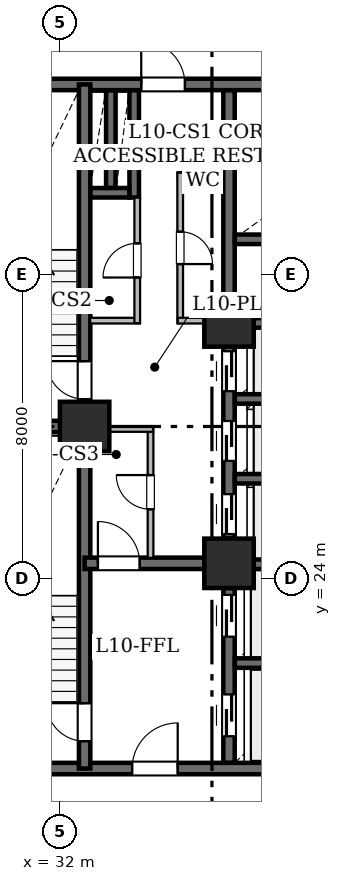
"""IFC4 building model, lengths in metres.
Left out: names, types, materials, properties, quantities, classifications, styles, units other than length and angle.
Written with IfcOpenShell. Run it as: python <this file> out.ifc"""

import sys

from ifc_helpers import new_model, si_unit, direction, frame, frame_2d, origin, origin_2d, place, context, subcontext, project, spatial, rectangle, hollow_rectangle, extrude, element, fill, save


model = new_model("IFC4")
c1 = context("Model", 3, precision=1e-05, world=origin(), true_north=direction((0.0, 1.0)))
c2 = subcontext(c1, "Body", "Model", "MODEL_VIEW")
j1 = project(units=[si_unit("LENGTHUNIT", "METRE"), si_unit("PLANEANGLEUNIT", "RADIAN")], contexts=[c1])
p1 = place(None, origin())
s1 = spatial("IfcSite", under=j1, at=p1, CompositionType="ELEMENT")
p2 = place(p1, origin())
s2 = spatial("IfcBuilding", under=s1, at=p2, CompositionType="ELEMENT")
p3 = place(p2, frame((0.0, 0.0, 44.25)))
s3 = spatial("IfcBuildingStorey", under=s2, at=p3, CompositionType="ELEMENT", Elevation=44.25)
for number, where, z_axis, x_axis in (
    (1, (32.65, 28.0, 0.0), (0.0, 0.0, 1.0), (1.0, 0.0, 0.0)),
    (2, (36.45, 24.4, 0.0), (0.0, 0.0, 1.0), (1.0, 0.0, 0.0)),
    (3, (36.45, 30.75, 0.0), (0.0, 0.0, 1.0), (1.0, 0.0, 0.0)),
):
    element("IfcColumn", number, at=place(p3, frame(where, z_axis=z_axis, x_axis=x_axis)), inside=s3, PredefinedType="COLUMN", context=c2, shape_type="SweptSolid", body=[
        extrude(hollow_rectangle(XDim=1.3, YDim=1.3, WallThickness=0.065, at=origin_2d()), origin(), (0.0, 0.0, 1.0), 3.65),
    ])
p4 = place(p3, frame((29.0, 19.0, 0.0), z_axis=(0.0, 0.0, 1.0), x_axis=(1.0, 0.0, 0.0)))
e4 = element("IfcWall", 4, at=p4, inside=s3, PredefinedType="SHEAR", context=c2, shape_type="SweptSolid", body=[
    extrude(rectangle(XDim=10.4, YDim=0.3, at=frame_2d((5.2, 0.0))), origin(), (0.0, 0.0, 1.0), 3.43),
])
p5 = place(p4, frame((4.9, 0.0, 0.0)))
e5 = element("IfcOpeningElement", 5, at=p5, cuts=e4, PredefinedType="OPENING", context=c2, shape_type="SweptSolid", body=[
    extrude(rectangle(XDim=1.2, YDim=2.15, at=frame_2d((0.6, 1.075))), frame((0.0, 0.16, 0.0), z_axis=(0.0, -1.0, 0.0), x_axis=(1.0, 0.0, 0.0)), (0.0, 0.0, 1.0), 0.32),
])
p6 = place(p3, frame((29.0, 37.0, 0.0), z_axis=(0.0, 0.0, 1.0), x_axis=(1.0, 0.0, 0.0)))
e6 = element("IfcWall", 6, at=p6, inside=s3, PredefinedType="SHEAR", context=c2, shape_type="SweptSolid", body=[
    extrude(rectangle(XDim=10.4, YDim=0.3, at=frame_2d((5.2, 0.0))), origin(), (0.0, 0.0, 1.0), 3.43),
])
p7 = place(p6, frame((5.14, 0.0, 0.0)))
e7 = element("IfcOpeningElement", 7, at=p7, cuts=e6, PredefinedType="OPENING", context=c2, shape_type="SweptSolid", body=[
    extrude(rectangle(XDim=1.15, YDim=2.2, at=frame_2d((0.575, 1.1))), frame((0.0, 0.16, 0.0), z_axis=(0.0, -1.0, 0.0), x_axis=(1.0, 0.0, 0.0)), (0.0, 0.0, 1.0), 0.32),
])
p8 = place(p3, frame((32.65, 19.0, 0.0), z_axis=(0.0, 0.0, 1.0), x_axis=(0.0, 1.0, 0.0)))
e8 = element("IfcWall", 8, at=p8, inside=s3, PredefinedType="SHEAR", context=c2, shape_type="SweptSolid", body=[
    extrude(rectangle(XDim=9.0, YDim=0.3, at=frame_2d((4.5, 0.0))), origin(), (0.0, 0.0, 1.0), 3.43),
])
p9 = place(p8, frame((0.72, 0.0, 0.0)))
e9 = element("IfcOpeningElement", 9, at=p9, cuts=e8, PredefinedType="OPENING", context=c2, shape_type="SweptSolid", body=[
    extrude(rectangle(XDim=1.0, YDim=2.15, at=frame_2d((0.5, 1.075))), frame((0.0, 0.16, 0.0), z_axis=(0.0, -1.0, 0.0), x_axis=(1.0, 0.0, 0.0)), (0.0, 0.0, 1.0), 0.32),
])
p10 = place(p3, frame((32.65, 28.0, 0.0), z_axis=(0.0, 0.0, 1.0), x_axis=(0.0, 1.0, 0.0)))
e10 = element("IfcWall", 10, at=p10, inside=s3, PredefinedType="SHEAR", context=c2, shape_type="SweptSolid", body=[
    extrude(rectangle(XDim=9.0, YDim=0.3, at=frame_2d((4.5, 0.0))), origin(), (0.0, 0.0, 1.0), 3.43),
])
p11 = place(p10, frame((0.72, 0.0, 0.0)))
e11 = element("IfcOpeningElement", 11, at=p11, cuts=e10, PredefinedType="OPENING", context=c2, shape_type="SweptSolid", body=[
    extrude(rectangle(XDim=1.0, YDim=2.15, at=frame_2d((0.5, 1.075))), frame((0.0, 0.16, 0.0), z_axis=(0.0, -1.0, 0.0), x_axis=(1.0, 0.0, 0.0)), (0.0, 0.0, 1.0), 0.32),
])
p12 = place(p3, frame((29.0, 28.0, 0.0), z_axis=(0.0, 0.0, 1.0), x_axis=(1.0, 0.0, 0.0)))
e12 = element("IfcWall", 12, at=p12, inside=s3, PredefinedType="SHEAR", context=c2, shape_type="SweptSolid", body=[
    extrude(rectangle(XDim=3.65, YDim=0.3, at=frame_2d((1.825, 0.0))), origin(), (0.0, 0.0, 1.0), 3.43),
])
p13 = place(p3, frame((32.65, 24.4, 0.0), z_axis=(0.0, 0.0, 1.0), x_axis=(1.0, 0.0, 0.0)))
e13 = element("IfcWall", 13, at=p13, inside=s3, PredefinedType="SHEAR", context=c2, shape_type="SweptSolid", body=[
    extrude(rectangle(XDim=3.8, YDim=0.3, at=frame_2d((1.9, 0.0))), origin(), (0.0, 0.0, 1.0), 3.43),
])
p14 = place(p13, frame((0.35, 0.0, 0.0)))
e14 = element("IfcOpeningElement", 14, at=p14, cuts=e13, PredefinedType="OPENING", context=c2, shape_type="SweptSolid", body=[
    extrude(rectangle(XDim=1.1, YDim=2.15, at=frame_2d((0.55, 1.075))), frame((0.0, 0.16, 0.0), z_axis=(0.0, -1.0, 0.0), x_axis=(1.0, 0.0, 0.0)), (0.0, 0.0, 1.0), 0.32),
])
p15 = place(p3, frame((36.45, 19.154, 0.0), z_axis=(0.0, 0.0, 1.0), x_axis=(0.0, 1.0, 0.0)))
e15 = element("IfcWall", 15, at=p15, inside=s3, PredefinedType="SHEAR", context=c2, shape_type="SweptSolid", body=[
    extrude(rectangle(XDim=4.596, YDim=0.3, at=frame_2d((2.298, 0.0))), origin(), (0.0, 0.0, 1.0), 3.43),
])
p16 = place(p15, frame((0.696, 0.0, 0.0)))
e16 = element("IfcOpeningElement", 16, at=p16, cuts=e15, PredefinedType="OPENING", context=c2, shape_type="SweptSolid", body=[
    extrude(rectangle(XDim=1.1, YDim=2.15, at=frame_2d((0.55, 1.075))), frame((0.0, 0.16, 0.0), z_axis=(0.0, -1.0, 0.0), x_axis=(1.0, 0.0, 0.0)), (0.0, 0.0, 1.0), 0.32),
])
p17 = place(p15, frame((3.316, 0.0, 0.0)))
e17 = element("IfcOpeningElement", 17, at=p17, cuts=e15, PredefinedType="OPENING", context=c2, shape_type="SweptSolid", body=[
    extrude(rectangle(XDim=1.1, YDim=2.15, at=frame_2d((0.55, 1.075))), frame((0.0, 0.16, 0.0), z_axis=(0.0, -1.0, 0.0), x_axis=(1.0, 0.0, 0.0)), (0.0, 0.0, 1.0), 0.32),
])
p18 = place(p3, frame((36.45, 25.05, 0.0), z_axis=(0.0, 0.0, 1.0), x_axis=(0.0, 1.0, 0.0)))
e18 = element("IfcWall", 18, at=p18, inside=s3, PredefinedType="SHEAR", context=c2, shape_type="SweptSolid", body=[
    extrude(rectangle(XDim=5.05, YDim=0.3, at=frame_2d((2.525, 0.0))), origin(), (0.0, 0.0, 1.0), 3.43),
])
p19 = place(p18, frame((0.12, 0.0, 0.0)))
e19 = element("IfcOpeningElement", 19, at=p19, cuts=e18, PredefinedType="OPENING", context=c2, shape_type="SweptSolid", body=[
    extrude(rectangle(XDim=1.05, YDim=2.15, at=frame_2d((0.525, 1.075))), frame((0.0, 0.16, 0.0), z_axis=(0.0, -1.0, 0.0), x_axis=(1.0, 0.0, 0.0)), (0.0, 0.0, 1.0), 0.32),
])
p20 = place(p18, frame((2.045, 0.0, 0.0)))
e20 = element("IfcOpeningElement", 20, at=p20, cuts=e18, PredefinedType="OPENING", context=c2, shape_type="SweptSolid", body=[
    extrude(rectangle(XDim=1.05, YDim=2.15, at=frame_2d((0.525, 1.075))), frame((0.0, 0.16, 0.0), z_axis=(0.0, -1.0, 0.0), x_axis=(1.0, 0.0, 0.0)), (0.0, 0.0, 1.0), 0.32),
])
p21 = place(p18, frame((3.88, 0.0, 0.0)))
e21 = element("IfcOpeningElement", 21, at=p21, cuts=e18, PredefinedType="OPENING", context=c2, shape_type="SweptSolid", body=[
    extrude(rectangle(XDim=1.05, YDim=2.15, at=frame_2d((0.525, 1.075))), frame((0.0, 0.16, 0.0), z_axis=(0.0, -1.0, 0.0), x_axis=(1.0, 0.0, 0.0)), (0.0, 0.0, 1.0), 0.32),
])
p22 = place(p3, frame((36.45, 31.4, 0.0), z_axis=(0.0, 0.0, 1.0), x_axis=(0.0, 1.0, 0.0)))
e22 = element("IfcWall", 22, at=p22, inside=s3, PredefinedType="SHEAR", context=c2, shape_type="SweptSolid", body=[
    extrude(rectangle(XDim=5.446, YDim=0.3, at=frame_2d((2.723, 0.0))), origin(), (0.0, 0.0, 1.0), 3.43),
])
for number, where, z_axis, x_axis in (
    (23, (36.604, 21.775, 0.0), (0.0, 0.0, 1.0), (1.0, 0.0, 0.0)),
    (24, (36.604, 24.375, 0.0), (0.0, 0.0, 1.0), (1.0, 0.0, 0.0)),
    (25, (36.604, 26.625, 0.0), (0.0, 0.0, 1.0), (1.0, 0.0, 0.0)),
    (26, (36.604, 28.725, 0.0), (0.0, 0.0, 1.0), (1.0, 0.0, 0.0)),
    (27, (36.604, 30.725, 0.0), (0.0, 0.0, 1.0), (1.0, 0.0, 0.0)),
    (28, (36.604, 32.925, 0.0), (0.0, 0.0, 1.0), (1.0, 0.0, 0.0)),
    (29, (36.604, 34.975, 0.0), (0.0, 0.0, 1.0), (1.0, 0.0, 0.0)),
):
    element("IfcWall", number, at=place(p3, frame(where, z_axis=z_axis, x_axis=x_axis)), inside=s3, PredefinedType="SHEAR", context=c2, shape_type="SweptSolid", body=[
        extrude(rectangle(XDim=2.642, YDim=0.25, at=frame_2d((1.321, 0.0))), origin(), (0.0, 0.0, 1.0), 3.43),
    ])
p23 = place(p3, frame((33.955, 34.025, 0.0), z_axis=(0.0, 0.0, 1.0), x_axis=(0.0, 1.0, 0.0)))
e30 = element("IfcWall", 30, at=p23, inside=s3, PredefinedType="SHEAR", context=c2, shape_type="SweptSolid", body=[
    extrude(rectangle(XDim=2.821, YDim=0.25, at=frame_2d((1.411, 0.0))), origin(), (0.0, 0.0, 1.0), 3.43),
])
p24 = place(p3, frame((32.804, 34.15, 0.0), z_axis=(0.0, 0.0, 1.0), x_axis=(1.0, 0.0, 0.0)))
e31 = element("IfcWall", 31, at=p24, inside=s3, PredefinedType="SHEAR", context=c2, shape_type="SweptSolid", body=[
    extrude(rectangle(XDim=1.022, YDim=0.25, at=frame_2d((0.511, 0.0))), origin(), (0.0, 0.0, 1.0), 3.43),
])
p25 = place(p3, frame((33.34, 34.279, 0.0), z_axis=(0.0, 0.0, 1.0), x_axis=(0.0, 1.0, 0.0)))
e32 = element("IfcWall", 32, at=p25, inside=s3, PredefinedType="SHEAR", context=c2, shape_type="SweptSolid", body=[
    extrude(rectangle(XDim=2.567, YDim=0.25, at=frame_2d((1.283, 0.0))), origin(), (0.0, 0.0, 1.0), 3.43),
])
p26 = place(p3, frame((36.306, 34.615, 0.0), z_axis=(0.0, 0.0, 1.0), x_axis=(-1.0, 0.0, 0.0)))
e33 = element("IfcWall", 33, at=p26, inside=s3, PredefinedType="STANDARD", context=c2, shape_type="SweptSolid", body=[
    extrude(rectangle(XDim=1.206, YDim=0.15, at=frame_2d((0.603, 0.0))), origin(), (0.0, 0.0, 1.0), 3.43),
])
p27 = place(p3, frame((35.165, 34.678, 0.0), z_axis=(0.0, 0.0, 1.0), x_axis=(0.0, -1.0, 0.0)))
e34 = element("IfcWall", 34, at=p27, inside=s3, PredefinedType="STANDARD", context=c2, shape_type="SweptSolid", body=[
    extrude(rectangle(XDim=3.958, YDim=0.15, at=frame_2d((1.979, 0.0))), origin(), (0.0, 0.0, 1.0), 3.43),
])
p28 = place(p27, frame((1.554, 0.0, 0.0)))
e35 = element("IfcOpeningElement", 35, at=p28, cuts=e34, PredefinedType="OPENING", context=c2, shape_type="SweptSolid", body=[
    extrude(rectangle(XDim=0.85, YDim=2.1, at=frame_2d((0.425, 1.05))), frame((0.0, 0.085, 0.0), z_axis=(0.0, -1.0, 0.0), x_axis=(1.0, 0.0, 0.0)), (0.0, 0.0, 1.0), 0.17),
])
p29 = place(p3, frame((35.102, 30.785, 0.0), z_axis=(0.0, 0.0, 1.0), x_axis=(1.0, 0.0, 0.0)))
e36 = element("IfcWall", 36, at=p29, inside=s3, PredefinedType="STANDARD", context=c2, shape_type="SweptSolid", body=[
    extrude(rectangle(XDim=1.198, YDim=0.15, at=frame_2d((0.599, 0.0))), origin(), (0.0, 0.0, 1.0), 3.43),
])
p30 = place(p3, frame((32.794, 30.785, 0.0), z_axis=(0.0, 0.0, 1.0), x_axis=(1.0, 0.0, 0.0)))
e37 = element("IfcWall", 37, at=p30, inside=s3, PredefinedType="STANDARD", context=c2, shape_type="SweptSolid", body=[
    extrude(rectangle(XDim=1.306, YDim=0.15, at=frame_2d((0.653, 0.0))), origin(), (0.0, 0.0, 1.0), 2.887),
])
p31 = place(p3, frame((34.035, 30.72, 0.0), z_axis=(0.0, 0.0, 1.0), x_axis=(0.0, 1.0, 0.0)))
e38 = element("IfcWall", 38, at=p31, inside=s3, PredefinedType="STANDARD", context=c2, shape_type="SweptSolid", body=[
    extrude(rectangle(XDim=3.3, YDim=0.15, at=frame_2d((1.65, 0.0))), origin(), (0.0, 0.0, 1.0), 3.43),
])
p32 = place(p31, frame((1.2, 0.0, 0.0)))
e39 = element("IfcOpeningElement", 39, at=p32, cuts=e38, PredefinedType="OPENING", context=c2, shape_type="SweptSolid", body=[
    extrude(rectangle(XDim=0.9, YDim=2.1, at=frame_2d((0.45, 1.05))), frame((0.0, 0.085, 0.0), z_axis=(0.0, -1.0, 0.0), x_axis=(1.0, 0.0, 0.0)), (0.0, 0.0, 1.0), 0.17),
])
p33 = place(p3, frame((34.385, 24.544, 0.0), z_axis=(0.0, 0.0, 1.0), x_axis=(0.0, 1.0, 0.0)))
e40 = element("IfcWall", 40, at=p33, inside=s3, PredefinedType="STANDARD", context=c2, shape_type="SweptSolid", body=[
    extrude(rectangle(XDim=3.456, YDim=0.15, at=frame_2d((1.728, 0.0))), origin(), (0.0, 0.0, 1.0), 3.43),
])
p34 = place(p33, frame((1.278, 0.0, 0.0)))
e41 = element("IfcOpeningElement", 41, at=p34, cuts=e40, PredefinedType="OPENING", context=c2, shape_type="SweptSolid", body=[
    extrude(rectangle(XDim=0.9, YDim=2.1, at=frame_2d((0.45, 1.05))), frame((0.0, 0.085, 0.0), z_axis=(0.0, -1.0, 0.0), x_axis=(1.0, 0.0, 0.0)), (0.0, 0.0, 1.0), 0.17),
])
p35 = place(p3, frame((34.45, 27.935, 0.0), z_axis=(0.0, 0.0, 1.0), x_axis=(-1.0, 0.0, 0.0)))
e42 = element("IfcWall", 42, at=p35, inside=s3, PredefinedType="STANDARD", context=c2, shape_type="SweptSolid", body=[
    extrude(rectangle(XDim=1.656, YDim=0.15, at=frame_2d((0.828, 0.0))), origin(), (0.0, 0.0, 1.0), 2.887),
])
p36 = place(p9, origin())
e43 = element("IfcDoor", 43, at=p36, inside=s3, OperationType="SINGLE_SWING_RIGHT", PredefinedType="DOOR", context=c2, shape_type="SweptSolid", body=[
    extrude(rectangle(XDim=1.0, YDim=2.15, at=frame_2d((0.5, 1.075))), frame((0.0, 0.025, 0.0), z_axis=(0.0, -1.0, 0.0), x_axis=(1.0, 0.0, 0.0)), (0.0, 0.0, 1.0), 0.05),
])
fill(e9, e43)
p37 = place(p11, origin())
e44 = element("IfcDoor", 44, at=p37, inside=s3, OperationType="SINGLE_SWING_RIGHT", PredefinedType="DOOR", context=c2, shape_type="SweptSolid", body=[
    extrude(rectangle(XDim=1.0, YDim=2.15, at=frame_2d((0.5, 1.075))), frame((0.0, 0.025, 0.0), z_axis=(0.0, -1.0, 0.0), x_axis=(1.0, 0.0, 0.0)), (0.0, 0.0, 1.0), 0.05),
])
fill(e11, e44)
p38 = place(p14, origin())
e45 = element("IfcDoor", 45, at=p38, inside=s3, OperationType="SINGLE_SWING_LEFT", PredefinedType="DOOR", context=c2, shape_type="SweptSolid", body=[
    extrude(rectangle(XDim=1.1, YDim=2.15, at=frame_2d((0.55, 1.075))), frame((0.0, 0.025, 0.0), z_axis=(0.0, -1.0, 0.0), x_axis=(1.0, 0.0, 0.0)), (0.0, 0.0, 1.0), 0.05),
])
fill(e14, e45)
p39 = place(p5, origin())
e46 = element("IfcDoor", 46, at=p39, inside=s3, OperationType="SINGLE_SWING_RIGHT", PredefinedType="DOOR", context=c2, shape_type="SweptSolid", body=[
    extrude(rectangle(XDim=1.2, YDim=2.15, at=frame_2d((0.6, 1.075))), frame((0.0, 0.025, 0.0), z_axis=(0.0, -1.0, 0.0), x_axis=(1.0, 0.0, 0.0)), (0.0, 0.0, 1.0), 0.05),
])
fill(e5, e46)
p40 = place(p7, origin())
e47 = element("IfcDoor", 47, at=p40, inside=s3, OperationType="SINGLE_SWING_LEFT", PredefinedType="DOOR", context=c2, shape_type="SweptSolid", body=[
    extrude(rectangle(XDim=1.15, YDim=2.2, at=frame_2d((0.575, 1.1))), frame((0.0, 0.025, 0.0), z_axis=(0.0, -1.0, 0.0), x_axis=(1.0, 0.0, 0.0)), (0.0, 0.0, 1.0), 0.05),
])
fill(e7, e47)
p41 = place(p16, origin())
e48 = element("IfcDoor", 48, at=p41, inside=s3, OperationType="SLIDING_TO_LEFT", PredefinedType="DOOR", context=c2, shape_type="SweptSolid", body=[
    extrude(rectangle(XDim=1.1, YDim=2.15, at=frame_2d((0.55, 1.075))), frame((0.0, 0.025, 0.0), z_axis=(0.0, -1.0, 0.0), x_axis=(1.0, 0.0, 0.0)), (0.0, 0.0, 1.0), 0.05),
])
fill(e16, e48)
p42 = place(p17, origin())
e49 = element("IfcDoor", 49, at=p42, inside=s3, OperationType="SLIDING_TO_LEFT", PredefinedType="DOOR", context=c2, shape_type="SweptSolid", body=[
    extrude(rectangle(XDim=1.1, YDim=2.15, at=frame_2d((0.55, 1.075))), frame((0.0, 0.025, 0.0), z_axis=(0.0, -1.0, 0.0), x_axis=(1.0, 0.0, 0.0)), (0.0, 0.0, 1.0), 0.05),
])
fill(e17, e49)
p43 = place(p19, origin())
e50 = element("IfcDoor", 50, at=p43, inside=s3, OperationType="SLIDING_TO_LEFT", PredefinedType="DOOR", context=c2, shape_type="SweptSolid", body=[
    extrude(rectangle(XDim=1.05, YDim=2.15, at=frame_2d((0.525, 1.075))), frame((0.0, 0.025, 0.0), z_axis=(0.0, -1.0, 0.0), x_axis=(1.0, 0.0, 0.0)), (0.0, 0.0, 1.0), 0.05),
])
fill(e19, e50)
p44 = place(p20, origin())
e51 = element("IfcDoor", 51, at=p44, inside=s3, OperationType="SLIDING_TO_LEFT", PredefinedType="DOOR", context=c2, shape_type="SweptSolid", body=[
    extrude(rectangle(XDim=1.05, YDim=2.15, at=frame_2d((0.525, 1.075))), frame((0.0, 0.025, 0.0), z_axis=(0.0, -1.0, 0.0), x_axis=(1.0, 0.0, 0.0)), (0.0, 0.0, 1.0), 0.05),
])
fill(e20, e51)
p45 = place(p21, origin())
e52 = element("IfcDoor", 52, at=p45, inside=s3, OperationType="SLIDING_TO_LEFT", PredefinedType="DOOR", context=c2, shape_type="SweptSolid", body=[
    extrude(rectangle(XDim=1.05, YDim=2.15, at=frame_2d((0.525, 1.075))), frame((0.0, 0.025, 0.0), z_axis=(0.0, -1.0, 0.0), x_axis=(1.0, 0.0, 0.0)), (0.0, 0.0, 1.0), 0.05),
])
fill(e21, e52)
p46 = place(p28, origin())
e53 = element("IfcDoor", 53, at=p46, inside=s3, OperationType="SINGLE_SWING_RIGHT", PredefinedType="DOOR", context=c2, shape_type="SweptSolid", body=[
    extrude(rectangle(XDim=0.85, YDim=2.1, at=frame_2d((0.425, 1.05))), frame((0.0, 0.025, 0.0), z_axis=(0.0, -1.0, 0.0), x_axis=(1.0, 0.0, 0.0)), (0.0, 0.0, 1.0), 0.05),
])
fill(e35, e53)
p47 = place(p32, origin())
e54 = element("IfcDoor", 54, at=p47, inside=s3, OperationType="SINGLE_SWING_LEFT", PredefinedType="DOOR", context=c2, shape_type="SweptSolid", body=[
    extrude(rectangle(XDim=0.9, YDim=2.1, at=frame_2d((0.45, 1.05))), frame((0.0, 0.025, 0.0), z_axis=(0.0, -1.0, 0.0), x_axis=(1.0, 0.0, 0.0)), (0.0, 0.0, 1.0), 0.05),
])
fill(e39, e54)
p48 = place(p34, origin())
e55 = element("IfcDoor", 55, at=p48, inside=s3, OperationType="SINGLE_SWING_RIGHT", PredefinedType="DOOR", context=c2, shape_type="SweptSolid", body=[
    extrude(rectangle(XDim=0.9, YDim=2.1, at=frame_2d((0.45, 1.05))), frame((0.0, 0.025, 0.0), z_axis=(0.0, -1.0, 0.0), x_axis=(1.0, 0.0, 0.0)), (0.0, 0.0, 1.0), 0.05),
])
fill(e41, e55)
save(model, sys.argv[1])
